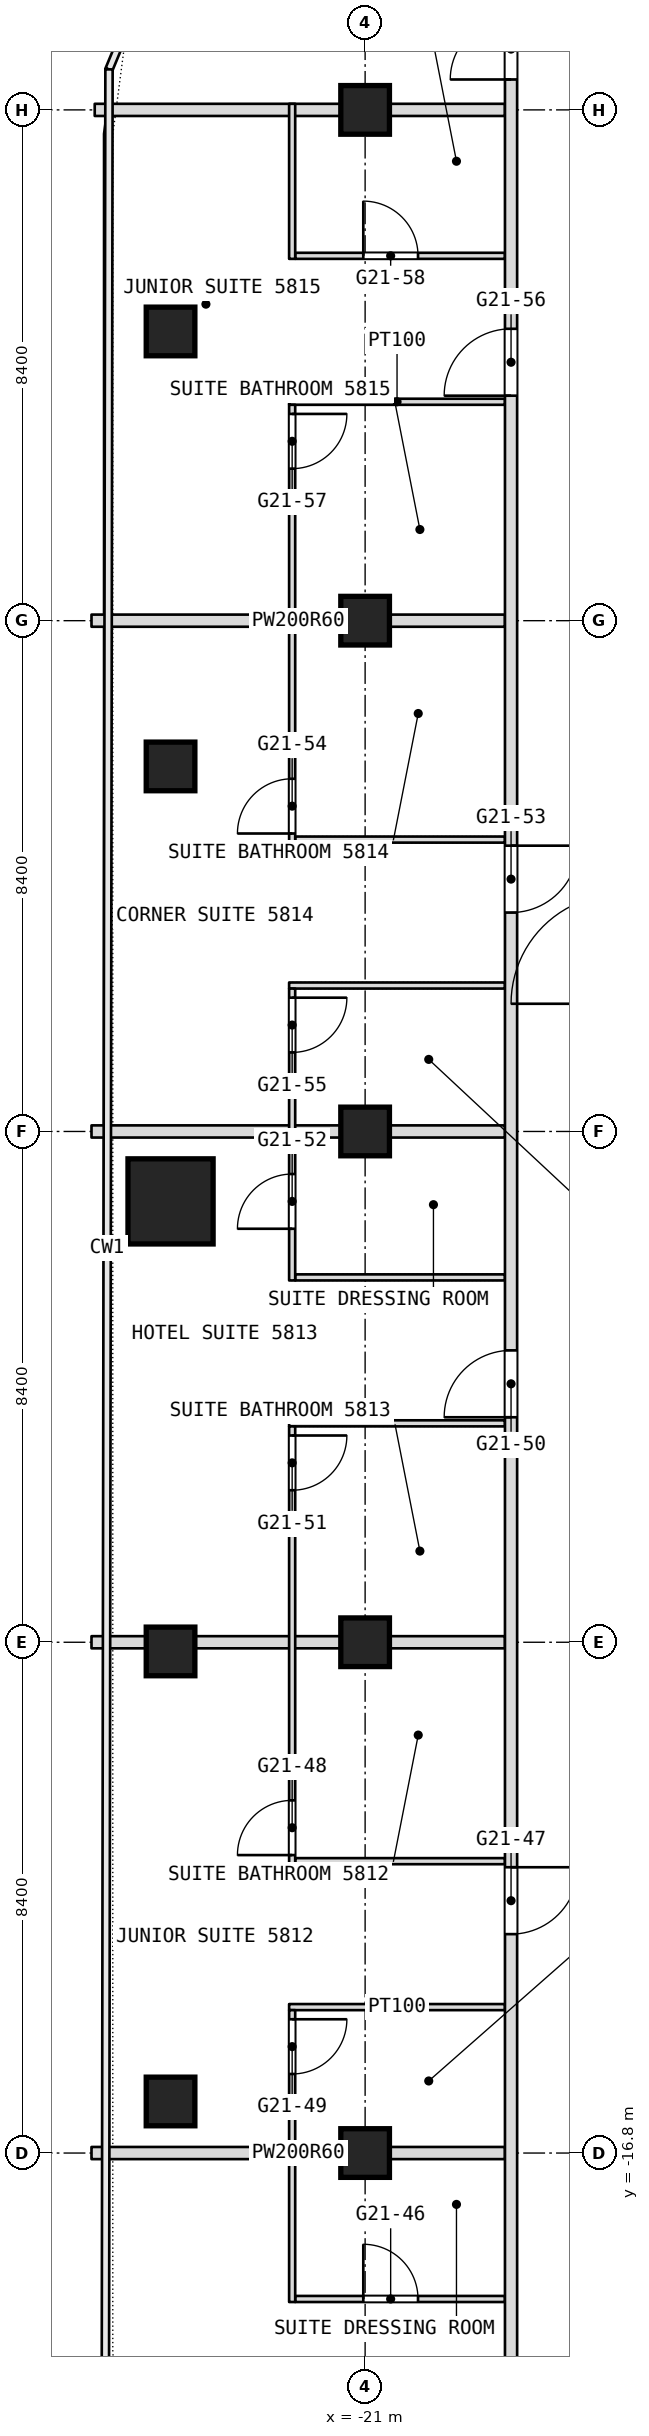
"""IFC4 building model, lengths in metres.
Left out: names, types, materials, properties, quantities, classifications, styles, units other than length and angle.
Written with IfcOpenShell. Run it as: python <this file> out.ifc"""

import sys

from ifc_helpers import new_model, si_unit, direction, frame, frame_2d, origin, origin_2d, place, context, subcontext, project, spatial, rectangle, extrude, element, fill, save


model = new_model("IFC4")
c1 = context("Model", 3, precision=1e-05, world=origin(), true_north=direction((0.0, 1.0)))
c2 = subcontext(c1, "Body", "Model", "MODEL_VIEW")
j1 = project(units=[si_unit("LENGTHUNIT", "METRE"), si_unit("PLANEANGLEUNIT", "RADIAN")], contexts=[c1])
p1 = place(None, origin())
s1 = spatial("IfcSite", under=j1, at=p1, CompositionType="ELEMENT")
p2 = place(p1, origin())
s2 = spatial("IfcBuilding", under=s1, at=p2, CompositionType="ELEMENT")
p3 = place(p2, frame((0.0, 0.0, 245.3)))
s3 = spatial("IfcBuildingStorey", under=s2, at=p3, CompositionType="ELEMENT", Elevation=245.3)
p4 = place(p3, frame((-24.2, -1.15, 0.0), z_axis=(0.0, 0.0, 1.0), x_axis=(1.0, 0.0, 0.0)))
e1 = element("IfcColumn", 1, at=p4, inside=s3, PredefinedType="COLUMN", context=c2, shape_type="SweptSolid", body=[
    extrude(rectangle(XDim=1.4, YDim=1.4, at=origin_2d()), origin(), (0.0, 0.0, 1.0), 3.6),
])
for number, where, z_axis, x_axis in (
    (2, (-21.0, -16.8, 0.0), (0.0, 0.0, 1.0), (1.0, 0.0, 0.0)),
    (3, (-21.0, -8.4, 0.0), (0.0, 0.0, 1.0), (1.0, 0.0, 0.0)),
    (4, (-21.0, 0.0, 0.0), (0.0, 0.0, 1.0), (1.0, 0.0, 0.0)),
    (5, (-21.0, 8.4, 0.0), (0.0, 0.0, 1.0), (1.0, 0.0, 0.0)),
    (6, (-21.0, 16.8, 0.0), (0.0, 0.0, 1.0), (1.0, 0.0, 0.0)),
    (7, (-24.2, -15.952, 0.0), (0.0, 0.0, 1.0), (1.0, 0.0, 0.0)),
    (8, (-24.2, -8.551, 0.0), (0.0, 0.0, 1.0), (1.0, 0.0, 0.0)),
    (9, (-24.2, 6.003, 0.0), (0.0, 0.0, 1.0), (1.0, 0.0, 0.0)),
    (10, (-24.2, 13.156, 0.0), (0.0, 0.0, 1.0), (1.0, 0.0, 0.0)),
):
    element("IfcColumn", number, at=place(p3, frame(where, z_axis=z_axis, x_axis=x_axis)), inside=s3, PredefinedType="COLUMN", context=c2, shape_type="SweptSolid", body=[
        extrude(rectangle(XDim=0.8, YDim=0.8, at=origin_2d()), origin(), (0.0, 0.0, 1.0), 3.6),
    ])
p5 = place(p3, frame((-22.15, -19.2, 0.0), z_axis=(0.0, 0.0, 1.0), x_axis=(1.0, 0.0, 0.0)))
e11 = element("IfcWall", 11, at=p5, inside=s3, PredefinedType="PARTITIONING", context=c2, shape_type="SweptSolid", body=[
    extrude(rectangle(XDim=3.45, YDim=0.1, at=frame_2d((1.725, 0.0))), origin(), (0.0, 0.0, 1.0), 3.34),
])
p6 = place(p5, frame((1.12, 0.0, 0.0)))
e12 = element("IfcOpeningElement", 12, at=p6, cuts=e11, PredefinedType="OPENING", context=c2, shape_type="SweptSolid", body=[
    extrude(rectangle(XDim=0.9, YDim=2.1, at=frame_2d((0.45, 1.05))), frame((0.0, 0.05, 0.0), z_axis=(0.0, -1.0, 0.0), x_axis=(1.0, 0.0, 0.0)), (0.0, 0.0, 1.0), 0.1),
])
p7 = place(p3, frame((-25.5, -16.8, 0.0), z_axis=(0.0, 0.0, 1.0), x_axis=(1.0, 0.0, 0.0)))
e13 = element("IfcWall", 13, at=p7, inside=s3, PredefinedType="PARTITIONING", context=c2, shape_type="SweptSolid", body=[
    extrude(rectangle(XDim=6.8, YDim=0.2, at=frame_2d((3.4, 0.0))), origin(), (0.0, 0.0, 1.0), 2.94),
])
p8 = place(p3, frame((-22.25, -14.4, 0.0), z_axis=(0.0, 0.0, 1.0), x_axis=(1.0, 0.0, 0.0)))
e14 = element("IfcWall", 14, at=p8, inside=s3, PredefinedType="PARTITIONING", context=c2, shape_type="SweptSolid", body=[
    extrude(rectangle(XDim=3.55, YDim=0.1, at=frame_2d((1.775, 0.0))), origin(), (0.0, 0.0, 1.0), 3.34),
])
p9 = place(p3, frame((-22.15, -12.0, 0.0), z_axis=(0.0, 0.0, 1.0), x_axis=(1.0, 0.0, 0.0)))
e15 = element("IfcWall", 15, at=p9, inside=s3, PredefinedType="PARTITIONING", context=c2, shape_type="SweptSolid", body=[
    extrude(rectangle(XDim=3.45, YDim=0.1, at=frame_2d((1.725, 0.0))), origin(), (0.0, 0.0, 1.0), 3.34),
])
p10 = place(p3, frame((-25.5, -8.4, 0.0), z_axis=(0.0, 0.0, 1.0), x_axis=(1.0, 0.0, 0.0)))
e16 = element("IfcWall", 16, at=p10, inside=s3, PredefinedType="PARTITIONING", context=c2, shape_type="SweptSolid", body=[
    extrude(rectangle(XDim=6.8, YDim=0.2, at=frame_2d((3.4, 0.0))), origin(), (0.0, 0.0, 1.0), 2.94),
])
p11 = place(p3, frame((-22.25, -4.8, 0.0), z_axis=(0.0, 0.0, 1.0), x_axis=(1.0, 0.0, 0.0)))
e17 = element("IfcWall", 17, at=p11, inside=s3, PredefinedType="PARTITIONING", context=c2, shape_type="SweptSolid", body=[
    extrude(rectangle(XDim=3.55, YDim=0.1, at=frame_2d((1.775, 0.0))), origin(), (0.0, 0.0, 1.0), 3.34),
])
p12 = place(p3, frame((-22.15, -2.4, 0.0), z_axis=(0.0, 0.0, 1.0), x_axis=(1.0, 0.0, 0.0)))
e18 = element("IfcWall", 18, at=p12, inside=s3, PredefinedType="PARTITIONING", context=c2, shape_type="SweptSolid", body=[
    extrude(rectangle(XDim=3.45, YDim=0.1, at=frame_2d((1.725, 0.0))), origin(), (0.0, 0.0, 1.0), 3.34),
])
p13 = place(p3, frame((-25.5, 0.0, 0.0), z_axis=(0.0, 0.0, 1.0), x_axis=(1.0, 0.0, 0.0)))
e19 = element("IfcWall", 19, at=p13, inside=s3, PredefinedType="PARTITIONING", context=c2, shape_type="SweptSolid", body=[
    extrude(rectangle(XDim=6.8, YDim=0.2, at=frame_2d((3.4, 0.0))), origin(), (0.0, 0.0, 1.0), 2.94),
])
p14 = place(p3, frame((-22.25, 2.4, 0.0), z_axis=(0.0, 0.0, 1.0), x_axis=(1.0, 0.0, 0.0)))
e20 = element("IfcWall", 20, at=p14, inside=s3, PredefinedType="PARTITIONING", context=c2, shape_type="SweptSolid", body=[
    extrude(rectangle(XDim=3.55, YDim=0.1, at=frame_2d((1.775, 0.0))), origin(), (0.0, 0.0, 1.0), 3.34),
])
p15 = place(p3, frame((-22.15, 4.8, 0.0), z_axis=(0.0, 0.0, 1.0), x_axis=(1.0, 0.0, 0.0)))
e21 = element("IfcWall", 21, at=p15, inside=s3, PredefinedType="PARTITIONING", context=c2, shape_type="SweptSolid", body=[
    extrude(rectangle(XDim=3.45, YDim=0.1, at=frame_2d((1.725, 0.0))), origin(), (0.0, 0.0, 1.0), 3.34),
])
p16 = place(p3, frame((-25.5, 8.4, 0.0), z_axis=(0.0, 0.0, 1.0), x_axis=(1.0, 0.0, 0.0)))
e22 = element("IfcWall", 22, at=p16, inside=s3, PredefinedType="PARTITIONING", context=c2, shape_type="SweptSolid", body=[
    extrude(rectangle(XDim=6.8, YDim=0.2, at=frame_2d((3.4, 0.0))), origin(), (0.0, 0.0, 1.0), 2.94),
])
p17 = place(p3, frame((-22.25, 12.0, 0.0), z_axis=(0.0, 0.0, 1.0), x_axis=(1.0, 0.0, 0.0)))
e23 = element("IfcWall", 23, at=p17, inside=s3, PredefinedType="PARTITIONING", context=c2, shape_type="SweptSolid", body=[
    extrude(rectangle(XDim=3.55, YDim=0.1, at=frame_2d((1.775, 0.0))), origin(), (0.0, 0.0, 1.0), 3.34),
])
p18 = place(p3, frame((-22.15, 14.4, 0.0), z_axis=(0.0, 0.0, 1.0), x_axis=(1.0, 0.0, 0.0)))
e24 = element("IfcWall", 24, at=p18, inside=s3, PredefinedType="PARTITIONING", context=c2, shape_type="SweptSolid", body=[
    extrude(rectangle(XDim=3.45, YDim=0.1, at=frame_2d((1.725, 0.0))), origin(), (0.0, 0.0, 1.0), 3.34),
])
p19 = place(p18, frame((1.12, 0.0, 0.0)))
e25 = element("IfcOpeningElement", 25, at=p19, cuts=e24, PredefinedType="OPENING", context=c2, shape_type="SweptSolid", body=[
    extrude(rectangle(XDim=0.9, YDim=2.1, at=frame_2d((0.45, 1.05))), frame((0.0, 0.05, 0.0), z_axis=(0.0, -1.0, 0.0), x_axis=(1.0, 0.0, 0.0)), (0.0, 0.0, 1.0), 0.1),
])
p20 = place(p3, frame((-25.447, 16.8, 0.0), z_axis=(0.0, 0.0, 1.0), x_axis=(1.0, 0.0, 0.0)))
e26 = element("IfcWall", 26, at=p20, inside=s3, PredefinedType="PARTITIONING", context=c2, shape_type="SweptSolid", body=[
    extrude(rectangle(XDim=6.747, YDim=0.2, at=frame_2d((3.374, 0.0))), origin(), (0.0, 0.0, 1.0), 2.94),
])
p21 = place(p3, frame((-18.6, -26.751, 0.0), z_axis=(0.0, 0.0, 1.0), x_axis=(0.0, 1.0, 0.0)))
e27 = element("IfcWall", 27, at=p21, inside=s3, PredefinedType="PARTITIONING", context=c2, shape_type="SweptSolid", body=[
    extrude(rectangle(XDim=49.091, YDim=0.2, at=frame_2d((24.545, 0.0))), origin(), (0.0, 0.0, 1.0), 3.34),
])
p22 = place(p21, frame((4.576, 0.0, 0.0)))
e28 = element("IfcOpeningElement", 28, at=p22, cuts=e27, PredefinedType="OPENING", context=c2, shape_type="SweptSolid", body=[
    extrude(rectangle(XDim=1.1, YDim=2.1, at=frame_2d((0.55, 1.05))), frame((0.0, 0.1, 0.0), z_axis=(0.0, -1.0, 0.0), x_axis=(1.0, 0.0, 0.0)), (0.0, 0.0, 1.0), 0.2),
])
p23 = place(p21, frame((13.551, 0.0, 0.0)))
e29 = element("IfcOpeningElement", 29, at=p23, cuts=e27, PredefinedType="OPENING", context=c2, shape_type="SweptSolid", body=[
    extrude(rectangle(XDim=1.1, YDim=2.1, at=frame_2d((0.55, 1.05))), frame((0.0, 0.1, 0.0), z_axis=(0.0, -1.0, 0.0), x_axis=(1.0, 0.0, 0.0)), (0.0, 0.0, 1.0), 0.2),
])
p24 = place(p21, frame((22.051, 0.0, 0.0)))
e30 = element("IfcOpeningElement", 30, at=p24, cuts=e27, PredefinedType="OPENING", context=c2, shape_type="SweptSolid", body=[
    extrude(rectangle(XDim=1.1, YDim=2.1, at=frame_2d((0.55, 1.05))), frame((0.0, 0.1, 0.0), z_axis=(0.0, -1.0, 0.0), x_axis=(1.0, 0.0, 0.0)), (0.0, 0.0, 1.0), 0.2),
])
p25 = place(p21, frame((30.351, 0.0, 0.0)))
e31 = element("IfcOpeningElement", 31, at=p25, cuts=e27, PredefinedType="OPENING", context=c2, shape_type="SweptSolid", body=[
    extrude(rectangle(XDim=1.1, YDim=2.1, at=frame_2d((0.55, 1.05))), frame((0.0, 0.1, 0.0), z_axis=(0.0, -1.0, 0.0), x_axis=(1.0, 0.0, 0.0)), (0.0, 0.0, 1.0), 0.2),
])
p26 = place(p21, frame((38.851, 0.0, 0.0)))
e32 = element("IfcOpeningElement", 32, at=p26, cuts=e27, PredefinedType="OPENING", context=c2, shape_type="SweptSolid", body=[
    extrude(rectangle(XDim=1.1, YDim=2.1, at=frame_2d((0.55, 1.05))), frame((0.0, 0.1, 0.0), z_axis=(0.0, -1.0, 0.0), x_axis=(1.0, 0.0, 0.0)), (0.0, 0.0, 1.0), 0.2),
])
p27 = place(p21, frame((44.051, 0.0, 0.0)))
e33 = element("IfcOpeningElement", 33, at=p27, cuts=e27, PredefinedType="OPENING", context=c2, shape_type="SweptSolid", body=[
    extrude(rectangle(XDim=1.0, YDim=2.1, at=frame_2d((0.5, 1.05))), frame((0.0, 0.1, 0.0), z_axis=(0.0, -1.0, 0.0), x_axis=(1.0, 0.0, 0.0)), (0.0, 0.0, 1.0), 0.2),
])
p28 = place(p3, frame((-22.2, -19.25, 0.0), z_axis=(0.0, 0.0, 1.0), x_axis=(0.0, 1.0, 0.0)))
e34 = element("IfcWall", 34, at=p28, inside=s3, PredefinedType="PARTITIONING", context=c2, shape_type="SweptSolid", body=[
    extrude(rectangle(XDim=4.8, YDim=0.1, at=frame_2d((2.4, 0.0))), origin(), (0.0, 0.0, 1.0), 3.34),
])
p29 = place(p28, frame((3.75, 0.0, 0.0)))
e35 = element("IfcOpeningElement", 35, at=p29, cuts=e34, PredefinedType="OPENING", context=c2, shape_type="SweptSolid", body=[
    extrude(rectangle(XDim=0.9, YDim=2.1, at=frame_2d((0.45, 1.05))), frame((0.0, 0.05, 0.0), z_axis=(0.0, -1.0, 0.0), x_axis=(1.0, 0.0, 0.0)), (0.0, 0.0, 1.0), 0.1),
])
p30 = place(p3, frame((-22.2, -12.05, 0.0), z_axis=(0.0, 0.0, 1.0), x_axis=(0.0, 1.0, 0.0)))
e36 = element("IfcWall", 36, at=p30, inside=s3, PredefinedType="PARTITIONING", context=c2, shape_type="SweptSolid", body=[
    extrude(rectangle(XDim=7.2, YDim=0.1, at=frame_2d((3.6, 0.0))), origin(), (0.0, 0.0, 1.0), 3.34),
])
p31 = place(p30, frame((0.15, 0.0, 0.0)))
e37 = element("IfcOpeningElement", 37, at=p31, cuts=e36, PredefinedType="OPENING", context=c2, shape_type="SweptSolid", body=[
    extrude(rectangle(XDim=0.9, YDim=2.1, at=frame_2d((0.45, 1.05))), frame((0.0, 0.05, 0.0), z_axis=(0.0, -1.0, 0.0), x_axis=(1.0, 0.0, 0.0)), (0.0, 0.0, 1.0), 0.1),
])
p32 = place(p30, frame((6.15, 0.0, 0.0)))
e38 = element("IfcOpeningElement", 38, at=p32, cuts=e36, PredefinedType="OPENING", context=c2, shape_type="SweptSolid", body=[
    extrude(rectangle(XDim=0.9, YDim=2.1, at=frame_2d((0.45, 1.05))), frame((0.0, 0.05, 0.0), z_axis=(0.0, -1.0, 0.0), x_axis=(1.0, 0.0, 0.0)), (0.0, 0.0, 1.0), 0.1),
])
p33 = place(p3, frame((-22.2, -2.45, 0.0), z_axis=(0.0, 0.0, 1.0), x_axis=(0.0, 1.0, 0.0)))
e39 = element("IfcWall", 39, at=p33, inside=s3, PredefinedType="PARTITIONING", context=c2, shape_type="SweptSolid", body=[
    extrude(rectangle(XDim=4.8, YDim=0.1, at=frame_2d((2.4, 0.0))), origin(), (0.0, 0.0, 1.0), 3.34),
])
p34 = place(p33, frame((0.85, 0.0, 0.0)))
e40 = element("IfcOpeningElement", 40, at=p34, cuts=e39, PredefinedType="OPENING", context=c2, shape_type="SweptSolid", body=[
    extrude(rectangle(XDim=0.9, YDim=2.1, at=frame_2d((0.45, 1.05))), frame((0.0, 0.05, 0.0), z_axis=(0.0, -1.0, 0.0), x_axis=(1.0, 0.0, 0.0)), (0.0, 0.0, 1.0), 0.1),
])
p35 = place(p33, frame((3.75, 0.0, 0.0)))
e41 = element("IfcOpeningElement", 41, at=p35, cuts=e39, PredefinedType="OPENING", context=c2, shape_type="SweptSolid", body=[
    extrude(rectangle(XDim=0.9, YDim=2.1, at=frame_2d((0.45, 1.05))), frame((0.0, 0.05, 0.0), z_axis=(0.0, -1.0, 0.0), x_axis=(1.0, 0.0, 0.0)), (0.0, 0.0, 1.0), 0.1),
])
p36 = place(p3, frame((-22.2, 4.75, 0.0), z_axis=(0.0, 0.0, 1.0), x_axis=(0.0, 1.0, 0.0)))
e42 = element("IfcWall", 42, at=p36, inside=s3, PredefinedType="PARTITIONING", context=c2, shape_type="SweptSolid", body=[
    extrude(rectangle(XDim=7.2, YDim=0.1, at=frame_2d((3.6, 0.0))), origin(), (0.0, 0.0, 1.0), 3.34),
])
p37 = place(p36, frame((0.15, 0.0, 0.0)))
e43 = element("IfcOpeningElement", 43, at=p37, cuts=e42, PredefinedType="OPENING", context=c2, shape_type="SweptSolid", body=[
    extrude(rectangle(XDim=0.9, YDim=2.1, at=frame_2d((0.45, 1.05))), frame((0.0, 0.05, 0.0), z_axis=(0.0, -1.0, 0.0), x_axis=(1.0, 0.0, 0.0)), (0.0, 0.0, 1.0), 0.1),
])
p38 = place(p36, frame((6.15, 0.0, 0.0)))
e44 = element("IfcOpeningElement", 44, at=p38, cuts=e42, PredefinedType="OPENING", context=c2, shape_type="SweptSolid", body=[
    extrude(rectangle(XDim=0.9, YDim=2.1, at=frame_2d((0.45, 1.05))), frame((0.0, 0.05, 0.0), z_axis=(0.0, -1.0, 0.0), x_axis=(1.0, 0.0, 0.0)), (0.0, 0.0, 1.0), 0.1),
])
p39 = place(p3, frame((-22.2, 14.35, 0.0), z_axis=(0.0, 0.0, 1.0), x_axis=(0.0, 1.0, 0.0)))
e45 = element("IfcWall", 45, at=p39, inside=s3, PredefinedType="PARTITIONING", context=c2, shape_type="SweptSolid", body=[
    extrude(rectangle(XDim=2.55, YDim=0.1, at=frame_2d((1.275, 0.0))), origin(), (0.0, 0.0, 1.0), 3.34),
])
p40 = place(p6, origin())
e46 = element("IfcDoor", 46, at=p40, inside=s3, OperationType="SINGLE_SWING_LEFT", PredefinedType="DOOR", context=c2, shape_type="SweptSolid", body=[
    extrude(rectangle(XDim=0.9, YDim=2.1, at=frame_2d((0.45, 1.05))), frame((0.0, 0.025, 0.0), z_axis=(0.0, -1.0, 0.0), x_axis=(1.0, 0.0, 0.0)), (0.0, 0.0, 1.0), 0.05),
])
fill(e12, e46)
p41 = place(p19, origin())
e47 = element("IfcDoor", 47, at=p41, inside=s3, OperationType="SINGLE_SWING_LEFT", PredefinedType="DOOR", context=c2, shape_type="SweptSolid", body=[
    extrude(rectangle(XDim=0.9, YDim=2.1, at=frame_2d((0.45, 1.05))), frame((0.0, 0.025, 0.0), z_axis=(0.0, -1.0, 0.0), x_axis=(1.0, 0.0, 0.0)), (0.0, 0.0, 1.0), 0.05),
])
fill(e25, e47)
p42 = place(p23, origin())
e48 = element("IfcDoor", 48, at=p42, inside=s3, OperationType="SINGLE_SWING_RIGHT", PredefinedType="DOOR", context=c2, shape_type="SweptSolid", body=[
    extrude(rectangle(XDim=1.1, YDim=2.1, at=frame_2d((0.55, 1.05))), frame((0.0, 0.025, 0.0), z_axis=(0.0, -1.0, 0.0), x_axis=(1.0, 0.0, 0.0)), (0.0, 0.0, 1.0), 0.05),
])
fill(e29, e48)
p43 = place(p24, origin())
e49 = element("IfcDoor", 49, at=p43, inside=s3, OperationType="SINGLE_SWING_LEFT", PredefinedType="DOOR", context=c2, shape_type="SweptSolid", body=[
    extrude(rectangle(XDim=1.1, YDim=2.1, at=frame_2d((0.55, 1.05))), frame((0.0, 0.025, 0.0), z_axis=(0.0, -1.0, 0.0), x_axis=(1.0, 0.0, 0.0)), (0.0, 0.0, 1.0), 0.05),
])
fill(e30, e49)
p44 = place(p25, origin())
e50 = element("IfcDoor", 50, at=p44, inside=s3, OperationType="SINGLE_SWING_RIGHT", PredefinedType="DOOR", context=c2, shape_type="SweptSolid", body=[
    extrude(rectangle(XDim=1.1, YDim=2.1, at=frame_2d((0.55, 1.05))), frame((0.0, 0.025, 0.0), z_axis=(0.0, -1.0, 0.0), x_axis=(1.0, 0.0, 0.0)), (0.0, 0.0, 1.0), 0.05),
])
fill(e31, e50)
p45 = place(p26, origin())
e51 = element("IfcDoor", 51, at=p45, inside=s3, OperationType="SINGLE_SWING_LEFT", PredefinedType="DOOR", context=c2, shape_type="SweptSolid", body=[
    extrude(rectangle(XDim=1.1, YDim=2.1, at=frame_2d((0.55, 1.05))), frame((0.0, 0.025, 0.0), z_axis=(0.0, -1.0, 0.0), x_axis=(1.0, 0.0, 0.0)), (0.0, 0.0, 1.0), 0.05),
])
fill(e32, e51)
p46 = place(p27, origin())
e52 = element("IfcDoor", 52, at=p46, inside=s3, OperationType="SINGLE_SWING_RIGHT", PredefinedType="DOOR", context=c2, shape_type="SweptSolid", body=[
    extrude(rectangle(XDim=1.0, YDim=2.1, at=frame_2d((0.5, 1.05))), frame((0.0, 0.025, 0.0), z_axis=(0.0, -1.0, 0.0), x_axis=(1.0, 0.0, 0.0)), (0.0, 0.0, 1.0), 0.05),
])
fill(e33, e52)
p47 = place(p29, origin())
e53 = element("IfcDoor", 53, at=p47, inside=s3, OperationType="SINGLE_SWING_LEFT", PredefinedType="DOOR", context=c2, shape_type="SweptSolid", body=[
    extrude(rectangle(XDim=0.9, YDim=2.1, at=frame_2d((0.45, 1.05))), frame((0.0, 0.025, 0.0), z_axis=(0.0, -1.0, 0.0), x_axis=(1.0, 0.0, 0.0)), (0.0, 0.0, 1.0), 0.05),
])
fill(e35, e53)
p48 = place(p31, origin())
e54 = element("IfcDoor", 54, at=p48, inside=s3, OperationType="SINGLE_SWING_RIGHT", PredefinedType="DOOR", context=c2, shape_type="SweptSolid", body=[
    extrude(rectangle(XDim=0.9, YDim=2.1, at=frame_2d((0.45, 1.05))), frame((0.0, 0.025, 0.0), z_axis=(0.0, -1.0, 0.0), x_axis=(1.0, 0.0, 0.0)), (0.0, 0.0, 1.0), 0.05),
])
fill(e37, e54)
p49 = place(p32, origin())
e55 = element("IfcDoor", 55, at=p49, inside=s3, OperationType="SINGLE_SWING_LEFT", PredefinedType="DOOR", context=c2, shape_type="SweptSolid", body=[
    extrude(rectangle(XDim=0.9, YDim=2.1, at=frame_2d((0.45, 1.05))), frame((0.0, 0.025, 0.0), z_axis=(0.0, -1.0, 0.0), x_axis=(1.0, 0.0, 0.0)), (0.0, 0.0, 1.0), 0.05),
])
fill(e38, e55)
p50 = place(p34, origin())
e56 = element("IfcDoor", 56, at=p50, inside=s3, OperationType="SINGLE_SWING_LEFT", PredefinedType="DOOR", context=c2, shape_type="SweptSolid", body=[
    extrude(rectangle(XDim=0.9, YDim=2.1, at=frame_2d((0.45, 1.05))), frame((0.0, 0.025, 0.0), z_axis=(0.0, -1.0, 0.0), x_axis=(1.0, 0.0, 0.0)), (0.0, 0.0, 1.0), 0.05),
])
fill(e40, e56)
p51 = place(p35, origin())
e57 = element("IfcDoor", 57, at=p51, inside=s3, OperationType="SINGLE_SWING_LEFT", PredefinedType="DOOR", context=c2, shape_type="SweptSolid", body=[
    extrude(rectangle(XDim=0.9, YDim=2.1, at=frame_2d((0.45, 1.05))), frame((0.0, 0.025, 0.0), z_axis=(0.0, -1.0, 0.0), x_axis=(1.0, 0.0, 0.0)), (0.0, 0.0, 1.0), 0.05),
])
fill(e41, e57)
p52 = place(p37, origin())
e58 = element("IfcDoor", 58, at=p52, inside=s3, OperationType="SINGLE_SWING_RIGHT", PredefinedType="DOOR", context=c2, shape_type="SweptSolid", body=[
    extrude(rectangle(XDim=0.9, YDim=2.1, at=frame_2d((0.45, 1.05))), frame((0.0, 0.025, 0.0), z_axis=(0.0, -1.0, 0.0), x_axis=(1.0, 0.0, 0.0)), (0.0, 0.0, 1.0), 0.05),
])
fill(e43, e58)
p53 = place(p38, origin())
e59 = element("IfcDoor", 59, at=p53, inside=s3, OperationType="SINGLE_SWING_LEFT", PredefinedType="DOOR", context=c2, shape_type="SweptSolid", body=[
    extrude(rectangle(XDim=0.9, YDim=2.1, at=frame_2d((0.45, 1.05))), frame((0.0, 0.025, 0.0), z_axis=(0.0, -1.0, 0.0), x_axis=(1.0, 0.0, 0.0)), (0.0, 0.0, 1.0), 0.05),
])
fill(e44, e59)
save(model, sys.argv[1])
